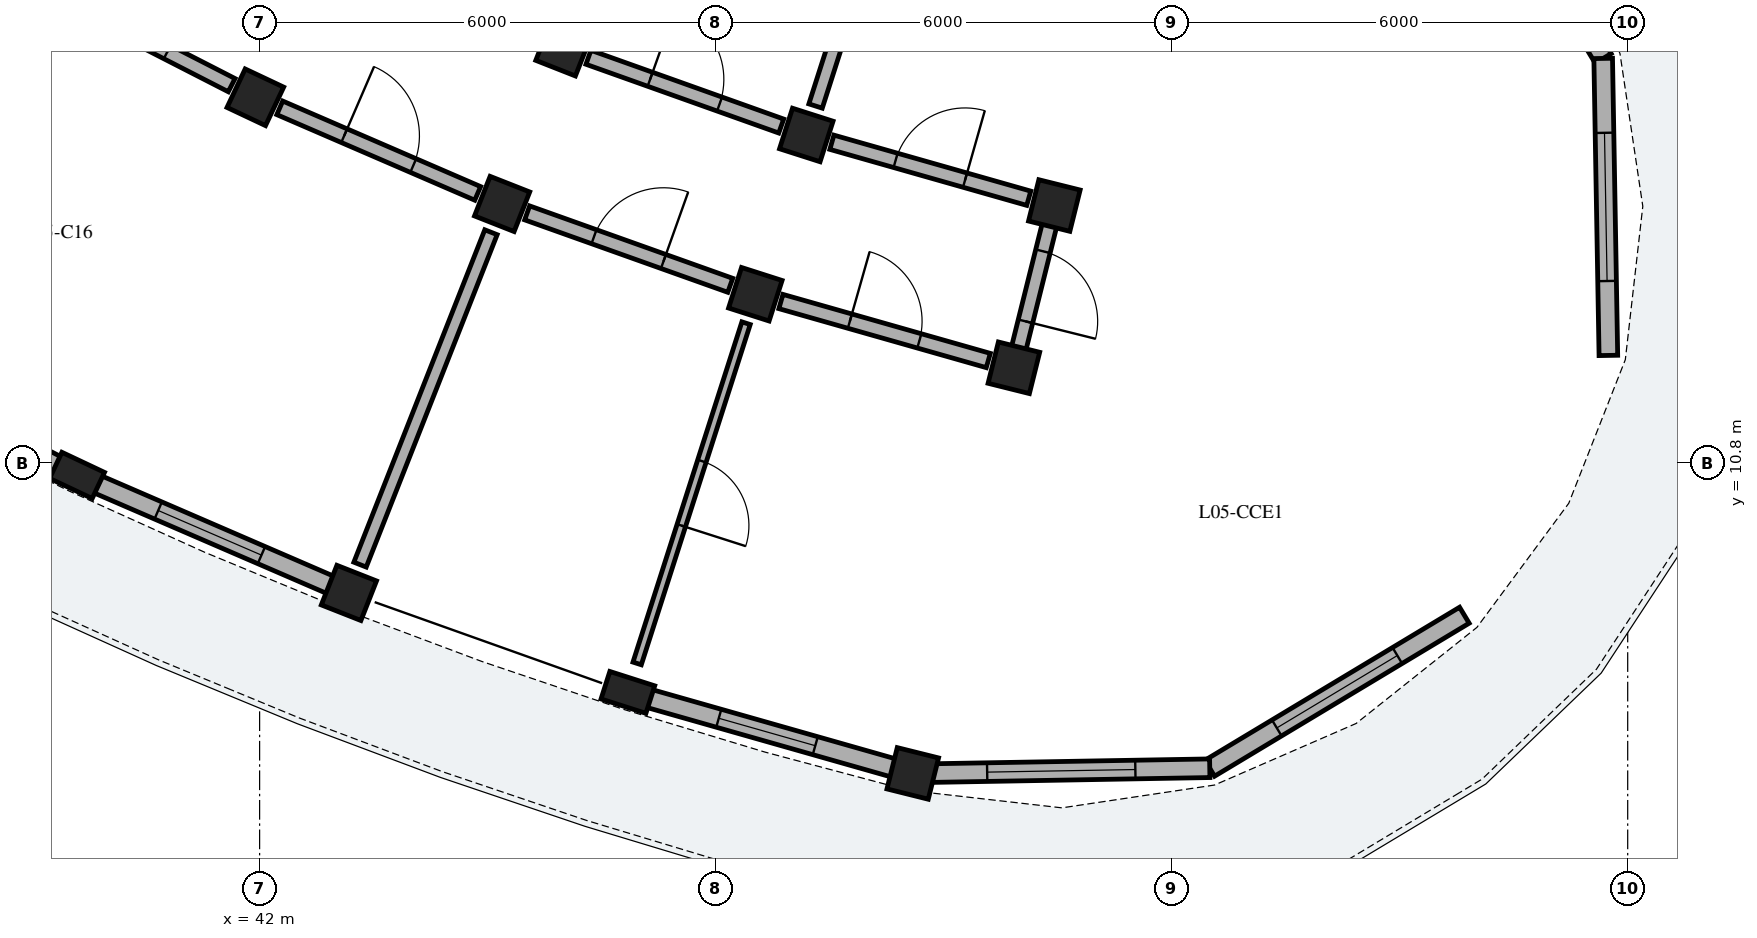
"""IFC4 building model, lengths in metres.
Left out: names, types, materials, properties, quantities, classifications, styles, units other than length and angle.
Written with IfcOpenShell. Run it as: python <this file> out.ifc"""

import sys

from ifc_helpers import new_model, si_unit, direction, frame, frame_2d, origin, origin_2d, place, context, subcontext, project, spatial, rectangle, extrude, element, fill, save


model = new_model("IFC4")
c1 = context("Model", 3, precision=1e-05, world=origin(), true_north=direction((0.0, 1.0)))
c2 = subcontext(c1, "Body", "Model", "MODEL_VIEW")
j1 = project(units=[si_unit("LENGTHUNIT", "METRE"), si_unit("PLANEANGLEUNIT", "RADIAN")], contexts=[c1])
p1 = place(None, origin())
s1 = spatial("IfcSite", under=j1, at=p1, CompositionType="ELEMENT")
p2 = place(p1, origin())
s2 = spatial("IfcBuilding", under=s1, at=p2, CompositionType="ELEMENT")
p3 = place(p2, frame((0.0, 0.0, 18.92)))
s3 = spatial("IfcBuildingStorey", under=s2, at=p3, CompositionType="ELEMENT", Elevation=18.92)
p4 = place(p3, frame((41.944, 15.614, 0.0), z_axis=(0.0, 0.0, 1.0), x_axis=(-0.426568739901, -0.904455145454, 0.0)))
e1 = element("IfcColumn", 1, at=p4, inside=s3, PredefinedType="COLUMN", context=c2, shape_type="SweptSolid", body=[
    extrude(rectangle(XDim=0.56, YDim=0.56, at=origin_2d()), origin(), (0.0, 0.0, 1.0), 3.11),
])
p5 = place(p3, frame((39.598, 10.64, 0.0), z_axis=(0.0, 0.0, 1.0), x_axis=(-0.426568739901, -0.904455145454, 0.0)))
e2 = element("IfcColumn", 2, at=p5, inside=s3, PredefinedType="PILASTER", context=c2, shape_type="SweptSolid", body=[
    extrude(rectangle(XDim=0.38, YDim=0.62, at=origin_2d()), origin(), (0.0, 0.0, 1.0), 3.11),
])
for number, where, z_axis, x_axis in (
    (3, (45.997, 16.258, 0.0), (0.0, 0.0, 1.0), (-0.367, -0.93, 0.0)),
    (4, (45.191, 14.211, 0.0), (0.0, 0.0, 1.0), (-0.367, -0.93, 0.0)),
    (5, (43.175, 9.094, 0.0), (0.0, 0.0, 1.0), (-0.367, -0.93, 0.0)),
    (6, (49.193, 15.118, 0.0), (0.0, 0.0, 1.0), (-0.305, -0.952, 0.0)),
    (7, (48.522, 13.023, 0.0), (0.0, 0.0, 1.0), (-0.305, -0.952, 0.0)),
):
    element("IfcColumn", number, at=place(p3, frame(where, z_axis=z_axis, x_axis=x_axis)), inside=s3, PredefinedType="COLUMN", context=c2, shape_type="SweptSolid", body=[
        extrude(rectangle(XDim=0.56, YDim=0.56, at=origin_2d()), origin(), (0.0, 0.0, 1.0), 3.11),
    ])
p6 = place(p3, frame((46.845, 7.785, 0.0), z_axis=(0.0, 0.0, 1.0), x_axis=(-0.304864299028, -0.952395799643, 0.0)))
e8 = element("IfcColumn", 8, at=p6, inside=s3, PredefinedType="PILASTER", context=c2, shape_type="SweptSolid", body=[
    extrude(rectangle(XDim=0.38, YDim=0.62, at=origin_2d()), origin(), (0.0, 0.0, 1.0), 3.11),
])
for number, where, z_axis, x_axis in (
    (9, (52.456, 14.19, 0.0), (0.0, 0.0, 1.0), (-0.242, -0.97, 0.0)),
    (10, (51.924, 12.055, 0.0), (0.0, 0.0, 1.0), (-0.242, -0.97, 0.0)),
    (11, (50.594, 6.719, 0.0), (0.0, 0.0, 1.0), (-0.242, -0.97, 0.0)),
):
    element("IfcColumn", number, at=place(p3, frame(where, z_axis=z_axis, x_axis=x_axis)), inside=s3, PredefinedType="COLUMN", context=c2, shape_type="SweptSolid", body=[
        extrude(rectangle(XDim=0.56, YDim=0.56, at=origin_2d()), origin(), (0.0, 0.0, 1.0), 3.11),
    ])
p7 = place(p3, frame((36.352, 12.302, 0.0), z_axis=(0.0, 0.0, 1.0), x_axis=(0.890001092753, -0.45595839163, 0.0)))
e12 = element("IfcWall", 12, at=p7, inside=s3, PredefinedType="SOLIDWALL", context=c2, shape_type="SweptSolid", body=[
    extrude(rectangle(XDim=3.487, YDim=0.245, at=frame_2d((1.743, 0.0))), origin(), (0.0, 0.0, 1.0), 2.355),
])
p8 = place(p7, frame((1.153, 0.0, 0.55)))
e13 = element("IfcOpeningElement", 13, at=p8, cuts=e12, PredefinedType="OPENING", context=c2, shape_type="SweptSolid", body=[
    extrude(rectangle(XDim=1.18, YDim=1.48, at=frame_2d((0.59, 0.74))), frame((0.0, 0.133, 0.0), z_axis=(0.0, -1.0, 0.0), x_axis=(1.0, 0.0, 0.0)), (0.0, 0.0, 1.0), 0.265),
])
p9 = place(p3, frame((39.745, 10.576, 0.0), z_axis=(0.0, 0.0, 1.0), x_axis=(0.917938367037, -0.396723019652, 0.0)))
e14 = element("IfcWall", 14, at=p9, inside=s3, PredefinedType="SOLIDWALL", context=c2, shape_type="SweptSolid", body=[
    extrude(rectangle(XDim=3.487, YDim=0.245, at=frame_2d((1.743, 0.0))), origin(), (0.0, 0.0, 1.0), 2.355),
])
p10 = place(p9, frame((1.003, 0.0, 0.55)))
e15 = element("IfcOpeningElement", 15, at=p10, cuts=e14, PredefinedType="OPENING", context=c2, shape_type="SweptSolid", body=[
    extrude(rectangle(XDim=1.48, YDim=1.62, at=frame_2d((0.74, 0.81))), frame((0.0, 0.133, 0.0), z_axis=(0.0, -1.0, 0.0), x_axis=(1.0, 0.0, 0.0)), (0.0, 0.0, 1.0), 0.265),
])
p11 = place(p3, frame((46.999, 7.741, 0.0), z_axis=(0.0, 0.0, 1.0), x_axis=(0.961871954212, -0.2735001713, 0.0)))
e16 = element("IfcWall", 16, at=p11, inside=s3, PredefinedType="SOLIDWALL", context=c2, shape_type="SweptSolid", body=[
    extrude(rectangle(XDim=3.487, YDim=0.245, at=frame_2d((1.743, 0.0))), origin(), (0.0, 0.0, 1.0), 2.355),
])
p12 = place(p11, frame((1.083, 0.0, 0.55)))
e17 = element("IfcOpeningElement", 17, at=p12, cuts=e16, PredefinedType="OPENING", context=c2, shape_type="SweptSolid", body=[
    extrude(rectangle(XDim=1.32, YDim=1.585, at=frame_2d((0.66, 0.792))), frame((0.0, 0.133, 0.0), z_axis=(0.0, -1.0, 0.0), x_axis=(1.0, 0.0, 0.0)), (0.0, 0.0, 1.0), 0.265),
])
p13 = place(p3, frame((57.665, 19.476, 0.0), z_axis=(0.0, 0.0, 1.0), x_axis=(0.515019321998, -0.857178568309, 0.0)))
e18 = element("IfcWall", 18, at=p13, inside=s3, PredefinedType="SOLIDWALL", context=c2, shape_type="SweptSolid", body=[
    extrude(rectangle(XDim=3.908, YDim=0.245, at=frame_2d((1.954, 0.0))), origin(), (0.0, 0.0, 1.0), 2.355),
])
p14 = place(p13, frame((1.029, 0.0, 0.4)))
e19 = element("IfcOpeningElement", 19, at=p14, cuts=e18, PredefinedType="OPENING", context=c2, shape_type="SweptSolid", body=[
    extrude(rectangle(XDim=1.85, YDim=1.72, at=frame_2d((0.925, 0.86))), frame((0.0, 0.133, 0.0), z_axis=(0.0, -1.0, 0.0), x_axis=(1.0, 0.0, 0.0)), (0.0, 0.0, 1.0), 0.265),
])
p15 = place(p3, frame((59.677, 16.126, 0.0), z_axis=(0.0, 0.0, 1.0), x_axis=(0.017490763899, -0.999847024888, 0.0)))
e20 = element("IfcWall", 20, at=p15, inside=s3, PredefinedType="SOLIDWALL", context=c2, shape_type="SweptSolid", body=[
    extrude(rectangle(XDim=3.908, YDim=0.245, at=frame_2d((1.954, 0.0))), origin(), (0.0, 0.0, 1.0), 2.355),
])
p16 = place(p15, frame((0.979, 0.0, 0.4)))
e21 = element("IfcOpeningElement", 21, at=p16, cuts=e20, PredefinedType="OPENING", context=c2, shape_type="SweptSolid", body=[
    extrude(rectangle(XDim=1.95, YDim=1.78, at=frame_2d((0.975, 0.89))), frame((0.0, 0.133, 0.0), z_axis=(0.0, -1.0, 0.0), x_axis=(1.0, 0.0, 0.0)), (0.0, 0.0, 1.0), 0.265),
])
p17 = place(p3, frame((57.851, 8.8, 0.0), z_axis=(0.0, 0.0, 1.0), x_axis=(-0.85715098885, -0.515065221417, 0.0)))
e22 = element("IfcWall", 22, at=p17, inside=s3, PredefinedType="SOLIDWALL", context=c2, shape_type="SweptSolid", body=[
    extrude(rectangle(XDim=3.908, YDim=0.245, at=frame_2d((1.954, 0.0))), origin(), (0.0, 0.0, 1.0), 2.355),
])
p18 = place(p17, frame((1.029, 0.0, 0.4)))
e23 = element("IfcOpeningElement", 23, at=p18, cuts=e22, PredefinedType="OPENING", context=c2, shape_type="SweptSolid", body=[
    extrude(rectangle(XDim=1.85, YDim=1.72, at=frame_2d((0.925, 0.86))), frame((0.0, 0.133, 0.0), z_axis=(0.0, -1.0, 0.0), x_axis=(1.0, 0.0, 0.0)), (0.0, 0.0, 1.0), 0.265),
])
p19 = place(p3, frame((54.501, 6.787, 0.0), z_axis=(0.0, 0.0, 1.0), x_axis=(-0.999848115368, -0.017428315893, 0.0)))
e24 = element("IfcWall", 24, at=p19, inside=s3, PredefinedType="SOLIDWALL", context=c2, shape_type="SweptSolid", body=[
    extrude(rectangle(XDim=3.908, YDim=0.245, at=frame_2d((1.954, 0.0))), origin(), (0.0, 0.0, 1.0), 2.355),
])
p20 = place(p19, frame((0.979, 0.0, 0.4)))
e25 = element("IfcOpeningElement", 25, at=p20, cuts=e24, PredefinedType="OPENING", context=c2, shape_type="SweptSolid", body=[
    extrude(rectangle(XDim=1.95, YDim=1.78, at=frame_2d((0.975, 0.89))), frame((0.0, 0.133, 0.0), z_axis=(0.0, -1.0, 0.0), x_axis=(1.0, 0.0, 0.0)), (0.0, 0.0, 1.0), 0.265),
])
p21 = place(p3, frame((39.107, 17.067, 0.0), z_axis=(0.0, 0.0, 1.0), x_axis=(0.890030590607, -0.45590080915, 0.0)))
e26 = element("IfcWall", 26, at=p21, inside=s3, PredefinedType="PARTITIONING", context=c2, shape_type="SweptSolid", body=[
    extrude(rectangle(XDim=2.837, YDim=0.195, at=frame_2d((1.418, 0.0))), origin(), (0.0, 0.0, 1.0), 2.37),
])
p22 = place(p21, frame((0.954, 0.0, 0.0)))
e27 = element("IfcOpeningElement", 27, at=p22, cuts=e26, PredefinedType="OPENING", context=c2, shape_type="SweptSolid", body=[
    extrude(rectangle(XDim=0.93, YDim=2.12, at=frame_2d((0.465, 1.06))), frame((0.0, 0.107, 0.0), z_axis=(0.0, -1.0, 0.0), x_axis=(1.0, 0.0, 0.0)), (0.0, 0.0, 1.0), 0.215),
])
p23 = place(p3, frame((42.265, 15.475, 0.0), z_axis=(0.0, 0.0, 1.0), x_axis=(0.917943439406, -0.396711282991, 0.0)))
e28 = element("IfcWall", 28, at=p23, inside=s3, PredefinedType="PARTITIONING", context=c2, shape_type="SweptSolid", body=[
    extrude(rectangle(XDim=2.837, YDim=0.195, at=frame_2d((1.418, 0.0))), origin(), (0.0, 0.0, 1.0), 2.37),
])
p24 = place(p23, frame((0.924, 0.0, 0.0)))
e29 = element("IfcOpeningElement", 29, at=p24, cuts=e28, PredefinedType="OPENING", context=c2, shape_type="SweptSolid", body=[
    extrude(rectangle(XDim=0.99, YDim=2.16, at=frame_2d((0.495, 1.08))), frame((0.0, 0.107, 0.0), z_axis=(0.0, -1.0, 0.0), x_axis=(1.0, 0.0, 0.0)), (0.0, 0.0, 1.0), 0.215),
])
p25 = place(p3, frame((45.044, 13.839, 0.0), z_axis=(0.0, 0.0, 1.0), x_axis=(-0.366468650514, -0.930430399434, 0.0)))
e30 = element("IfcWall", 30, at=p25, inside=s3, PredefinedType="PARTITIONING", context=c2, shape_type="SweptSolid", body=[
    extrude(rectangle(XDim=4.7, YDim=0.175, at=frame_2d((2.35, 0.0))), origin(), (0.0, 0.0, 1.0), 2.37),
])
p26 = place(p3, frame((45.52, 14.093, 0.0), z_axis=(0.0, 0.0, 1.0), x_axis=(0.941930628611, -0.335807520589, 0.0)))
e31 = element("IfcWall", 31, at=p26, inside=s3, PredefinedType="PARTITIONING", context=c2, shape_type="SweptSolid", body=[
    extrude(rectangle(XDim=2.837, YDim=0.195, at=frame_2d((1.418, 0.0))), origin(), (0.0, 0.0, 1.0), 2.37),
])
p27 = place(p26, frame((0.934, 0.0, 0.0)))
e32 = element("IfcOpeningElement", 32, at=p27, cuts=e31, PredefinedType="OPENING", context=c2, shape_type="SweptSolid", body=[
    extrude(rectangle(XDim=0.97, YDim=2.15, at=frame_2d((0.485, 1.075))), frame((0.0, 0.107, 0.0), z_axis=(0.0, -1.0, 0.0), x_axis=(1.0, 0.0, 0.0)), (0.0, 0.0, 1.0), 0.215),
])
p28 = place(p3, frame((46.327, 16.14, 0.0), z_axis=(0.0, 0.0, 1.0), x_axis=(0.941895652647, -0.335905611036, 0.0)))
e33 = element("IfcWall", 33, at=p28, inside=s3, PredefinedType="PARTITIONING", context=c2, shape_type="SweptSolid", body=[
    extrude(rectangle(XDim=2.693, YDim=0.195, at=frame_2d((1.346, 0.0))), origin(), (0.0, 0.0, 1.0), 2.37),
])
p29 = place(p28, frame((0.862, 0.0, 0.0)))
e34 = element("IfcOpeningElement", 34, at=p29, cuts=e33, PredefinedType="OPENING", context=c2, shape_type="SweptSolid", body=[
    extrude(rectangle(XDim=0.97, YDim=2.15, at=frame_2d((0.485, 1.075))), frame((0.0, 0.107, 0.0), z_axis=(0.0, -1.0, 0.0), x_axis=(1.0, 0.0, 0.0)), (0.0, 0.0, 1.0), 0.215),
])
p30 = place(p3, frame((48.4, 12.642, 0.0), z_axis=(0.0, 0.0, 1.0), x_axis=(-0.304860540454, -0.952397002764, 0.0)))
e35 = element("IfcWall", 35, at=p30, inside=s3, PredefinedType="PARTITIONING", context=c2, shape_type="SweptSolid", body=[
    extrude(rectangle(XDim=4.7, YDim=0.115, at=frame_2d((2.35, 0.0))), origin(), (0.0, 0.0, 1.0), 2.37),
])
p31 = place(p30, frame((1.905, 0.0, 0.0)))
e36 = element("IfcOpeningElement", 36, at=p31, cuts=e35, PredefinedType="OPENING", context=c2, shape_type="SweptSolid", body=[
    extrude(rectangle(XDim=0.89, YDim=2.1, at=frame_2d((0.445, 1.05))), frame((0.0, 0.067, 0.0), z_axis=(0.0, -1.0, 0.0), x_axis=(1.0, 0.0, 0.0)), (0.0, 0.0, 1.0), 0.135),
])
p32 = place(p3, frame((51.327, 21.785, 0.0), z_axis=(0.0, 0.0, 1.0), x_axis=(-0.304875046605, -0.95239235925, 0.0)))
e37 = element("IfcWall", 37, at=p32, inside=s3, PredefinedType="PARTITIONING", context=c2, shape_type="SweptSolid", body=[
    extrude(rectangle(XDim=6.6, YDim=0.185, at=frame_2d((3.3, 0.0))), origin(), (0.0, 0.0, 1.0), 2.37),
])
p33 = place(p3, frame((48.859, 12.927, 0.0), z_axis=(0.0, 0.0, 1.0), x_axis=(0.961873892319, -0.273493355085, 0.0)))
e38 = element("IfcWall", 38, at=p33, inside=s3, PredefinedType="PARTITIONING", context=c2, shape_type="SweptSolid", body=[
    extrude(rectangle(XDim=2.837, YDim=0.195, at=frame_2d((1.418, 0.0))), origin(), (0.0, 0.0, 1.0), 2.37),
])
p34 = place(p33, frame((0.944, 0.0, 0.0)))
e39 = element("IfcOpeningElement", 39, at=p34, cuts=e38, PredefinedType="OPENING", context=c2, shape_type="SweptSolid", body=[
    extrude(rectangle(XDim=0.95, YDim=2.13, at=frame_2d((0.475, 1.065))), frame((0.0, 0.107, 0.0), z_axis=(0.0, -1.0, 0.0), x_axis=(1.0, 0.0, 0.0)), (0.0, 0.0, 1.0), 0.215),
])
p35 = place(p3, frame((49.53, 15.022, 0.0), z_axis=(0.0, 0.0, 1.0), x_axis=(0.961861926514, -0.273535435224, 0.0)))
e40 = element("IfcWall", 40, at=p35, inside=s3, PredefinedType="PARTITIONING", context=c2, shape_type="SweptSolid", body=[
    extrude(rectangle(XDim=2.693, YDim=0.195, at=frame_2d((1.346, 0.0))), origin(), (0.0, 0.0, 1.0), 2.37),
])
p36 = place(p35, frame((0.872, 0.0, 0.0)))
e41 = element("IfcOpeningElement", 41, at=p36, cuts=e40, PredefinedType="OPENING", context=c2, shape_type="SweptSolid", body=[
    extrude(rectangle(XDim=0.95, YDim=2.13, at=frame_2d((0.475, 1.065))), frame((0.0, 0.107, 0.0), z_axis=(0.0, -1.0, 0.0), x_axis=(1.0, 0.0, 0.0)), (0.0, 0.0, 1.0), 0.215),
])
p37 = place(p3, frame((52.444, 14.142, 0.0), z_axis=(0.0, 0.0, 1.0), x_axis=(-0.241933770084, -0.970292765557, 0.0)))
e42 = element("IfcWall", 42, at=p37, inside=s3, PredefinedType="PARTITIONING", context=c2, shape_type="SweptSolid", body=[
    extrude(rectangle(XDim=2.1, YDim=0.195, at=frame_2d((1.05, 0.0))), origin(), (0.0, 0.0, 1.0), 2.37),
])
p38 = place(p37, frame((0.57, 0.0, 0.0)))
e43 = element("IfcOpeningElement", 43, at=p38, cuts=e42, PredefinedType="OPENING", context=c2, shape_type="SweptSolid", body=[
    extrude(rectangle(XDim=0.95, YDim=2.13, at=frame_2d((0.475, 1.065))), frame((0.0, 0.107, 0.0), z_axis=(0.0, -1.0, 0.0), x_axis=(1.0, 0.0, 0.0)), (0.0, 0.0, 1.0), 0.215),
])
p39 = place(p10, origin())
e44 = element("IfcWindow", 44, at=p39, inside=s3, PartitioningType="SINGLE_PANEL", PredefinedType="WINDOW", context=c2, shape_type="SweptSolid", body=[
    extrude(rectangle(XDim=1.48, YDim=1.62, at=frame_2d((0.74, 0.81))), frame((0.0, 0.03, 0.0), z_axis=(0.0, -1.0, 0.0), x_axis=(1.0, 0.0, 0.0)), (0.0, 0.0, 1.0), 0.06),
])
fill(e15, e44)
p40 = place(p12, origin())
e45 = element("IfcWindow", 45, at=p40, inside=s3, PartitioningType="SINGLE_PANEL", PredefinedType="WINDOW", context=c2, shape_type="SweptSolid", body=[
    extrude(rectangle(XDim=1.32, YDim=1.585, at=frame_2d((0.66, 0.792))), frame((0.0, 0.03, 0.0), z_axis=(0.0, -1.0, 0.0), x_axis=(1.0, 0.0, 0.0)), (0.0, 0.0, 1.0), 0.06),
])
fill(e17, e45)
p41 = place(p16, origin())
e46 = element("IfcWindow", 46, at=p41, inside=s3, PartitioningType="SINGLE_PANEL", PredefinedType="WINDOW", context=c2, shape_type="SweptSolid", body=[
    extrude(rectangle(XDim=1.95, YDim=1.78, at=frame_2d((0.975, 0.89))), frame((0.0, 0.03, 0.0), z_axis=(0.0, -1.0, 0.0), x_axis=(1.0, 0.0, 0.0)), (0.0, 0.0, 1.0), 0.06),
])
fill(e21, e46)
p42 = place(p18, origin())
e47 = element("IfcWindow", 47, at=p42, inside=s3, PartitioningType="SINGLE_PANEL", PredefinedType="WINDOW", context=c2, shape_type="SweptSolid", body=[
    extrude(rectangle(XDim=1.85, YDim=1.72, at=frame_2d((0.925, 0.86))), frame((0.0, 0.03, 0.0), z_axis=(0.0, -1.0, 0.0), x_axis=(1.0, 0.0, 0.0)), (0.0, 0.0, 1.0), 0.06),
])
fill(e23, e47)
p43 = place(p20, origin())
e48 = element("IfcWindow", 48, at=p43, inside=s3, PartitioningType="SINGLE_PANEL", PredefinedType="WINDOW", context=c2, shape_type="SweptSolid", body=[
    extrude(rectangle(XDim=1.95, YDim=1.78, at=frame_2d((0.975, 0.89))), frame((0.0, 0.03, 0.0), z_axis=(0.0, -1.0, 0.0), x_axis=(1.0, 0.0, 0.0)), (0.0, 0.0, 1.0), 0.06),
])
fill(e25, e48)
p44 = place(p22, origin())
e49 = element("IfcDoor", 49, at=p44, inside=s3, OperationType="SINGLE_SWING_RIGHT", PredefinedType="DOOR", context=c2, shape_type="SweptSolid", body=[
    extrude(rectangle(XDim=0.93, YDim=2.12, at=frame_2d((0.465, 1.06))), frame((0.0, 0.025, 0.0), z_axis=(0.0, -1.0, 0.0), x_axis=(1.0, 0.0, 0.0)), (0.0, 0.0, 1.0), 0.05),
])
fill(e27, e49)
p45 = place(p24, origin())
e50 = element("IfcDoor", 50, at=p45, inside=s3, OperationType="SINGLE_SWING_LEFT", PredefinedType="DOOR", context=c2, shape_type="SweptSolid", body=[
    extrude(rectangle(XDim=0.99, YDim=2.16, at=frame_2d((0.495, 1.08))), frame((0.0, 0.025, 0.0), z_axis=(0.0, -1.0, 0.0), x_axis=(1.0, 0.0, 0.0)), (0.0, 0.0, 1.0), 0.05),
])
fill(e29, e50)
p46 = place(p27, origin())
e51 = element("IfcDoor", 51, at=p46, inside=s3, OperationType="SINGLE_SWING_RIGHT", PredefinedType="DOOR", context=c2, shape_type="SweptSolid", body=[
    extrude(rectangle(XDim=0.97, YDim=2.15, at=frame_2d((0.485, 1.075))), frame((0.0, 0.025, 0.0), z_axis=(0.0, -1.0, 0.0), x_axis=(1.0, 0.0, 0.0)), (0.0, 0.0, 1.0), 0.05),
])
fill(e32, e51)
p47 = place(p29, origin())
e52 = element("IfcDoor", 52, at=p47, inside=s3, OperationType="SINGLE_SWING_LEFT", PredefinedType="DOOR", context=c2, shape_type="SweptSolid", body=[
    extrude(rectangle(XDim=0.97, YDim=2.15, at=frame_2d((0.485, 1.075))), frame((0.0, 0.025, 0.0), z_axis=(0.0, -1.0, 0.0), x_axis=(1.0, 0.0, 0.0)), (0.0, 0.0, 1.0), 0.05),
])
fill(e34, e52)
p48 = place(p31, origin())
e53 = element("IfcDoor", 53, at=p48, inside=s3, OperationType="SINGLE_SWING_RIGHT", PredefinedType="DOOR", context=c2, shape_type="SweptSolid", body=[
    extrude(rectangle(XDim=0.89, YDim=2.1, at=frame_2d((0.445, 1.05))), frame((0.0, 0.025, 0.0), z_axis=(0.0, -1.0, 0.0), x_axis=(1.0, 0.0, 0.0)), (0.0, 0.0, 1.0), 0.05),
])
fill(e36, e53)
p49 = place(p34, origin())
e54 = element("IfcDoor", 54, at=p49, inside=s3, OperationType="SINGLE_SWING_LEFT", PredefinedType="DOOR", context=c2, shape_type="SweptSolid", body=[
    extrude(rectangle(XDim=0.95, YDim=2.13, at=frame_2d((0.475, 1.065))), frame((0.0, 0.025, 0.0), z_axis=(0.0, -1.0, 0.0), x_axis=(1.0, 0.0, 0.0)), (0.0, 0.0, 1.0), 0.05),
])
fill(e39, e54)
p50 = place(p36, origin())
e55 = element("IfcDoor", 55, at=p50, inside=s3, OperationType="SINGLE_SWING_RIGHT", PredefinedType="DOOR", context=c2, shape_type="SweptSolid", body=[
    extrude(rectangle(XDim=0.95, YDim=2.13, at=frame_2d((0.475, 1.065))), frame((0.0, 0.025, 0.0), z_axis=(0.0, -1.0, 0.0), x_axis=(1.0, 0.0, 0.0)), (0.0, 0.0, 1.0), 0.05),
])
fill(e41, e55)
p51 = place(p38, origin())
e56 = element("IfcDoor", 56, at=p51, inside=s3, OperationType="SINGLE_SWING_RIGHT", PredefinedType="DOOR", context=c2, shape_type="SweptSolid", body=[
    extrude(rectangle(XDim=0.95, YDim=2.13, at=frame_2d((0.475, 1.065))), frame((0.0, 0.025, 0.0), z_axis=(0.0, -1.0, 0.0), x_axis=(1.0, 0.0, 0.0)), (0.0, 0.0, 1.0), 0.05),
])
fill(e43, e56)
save(model, sys.argv[1])
